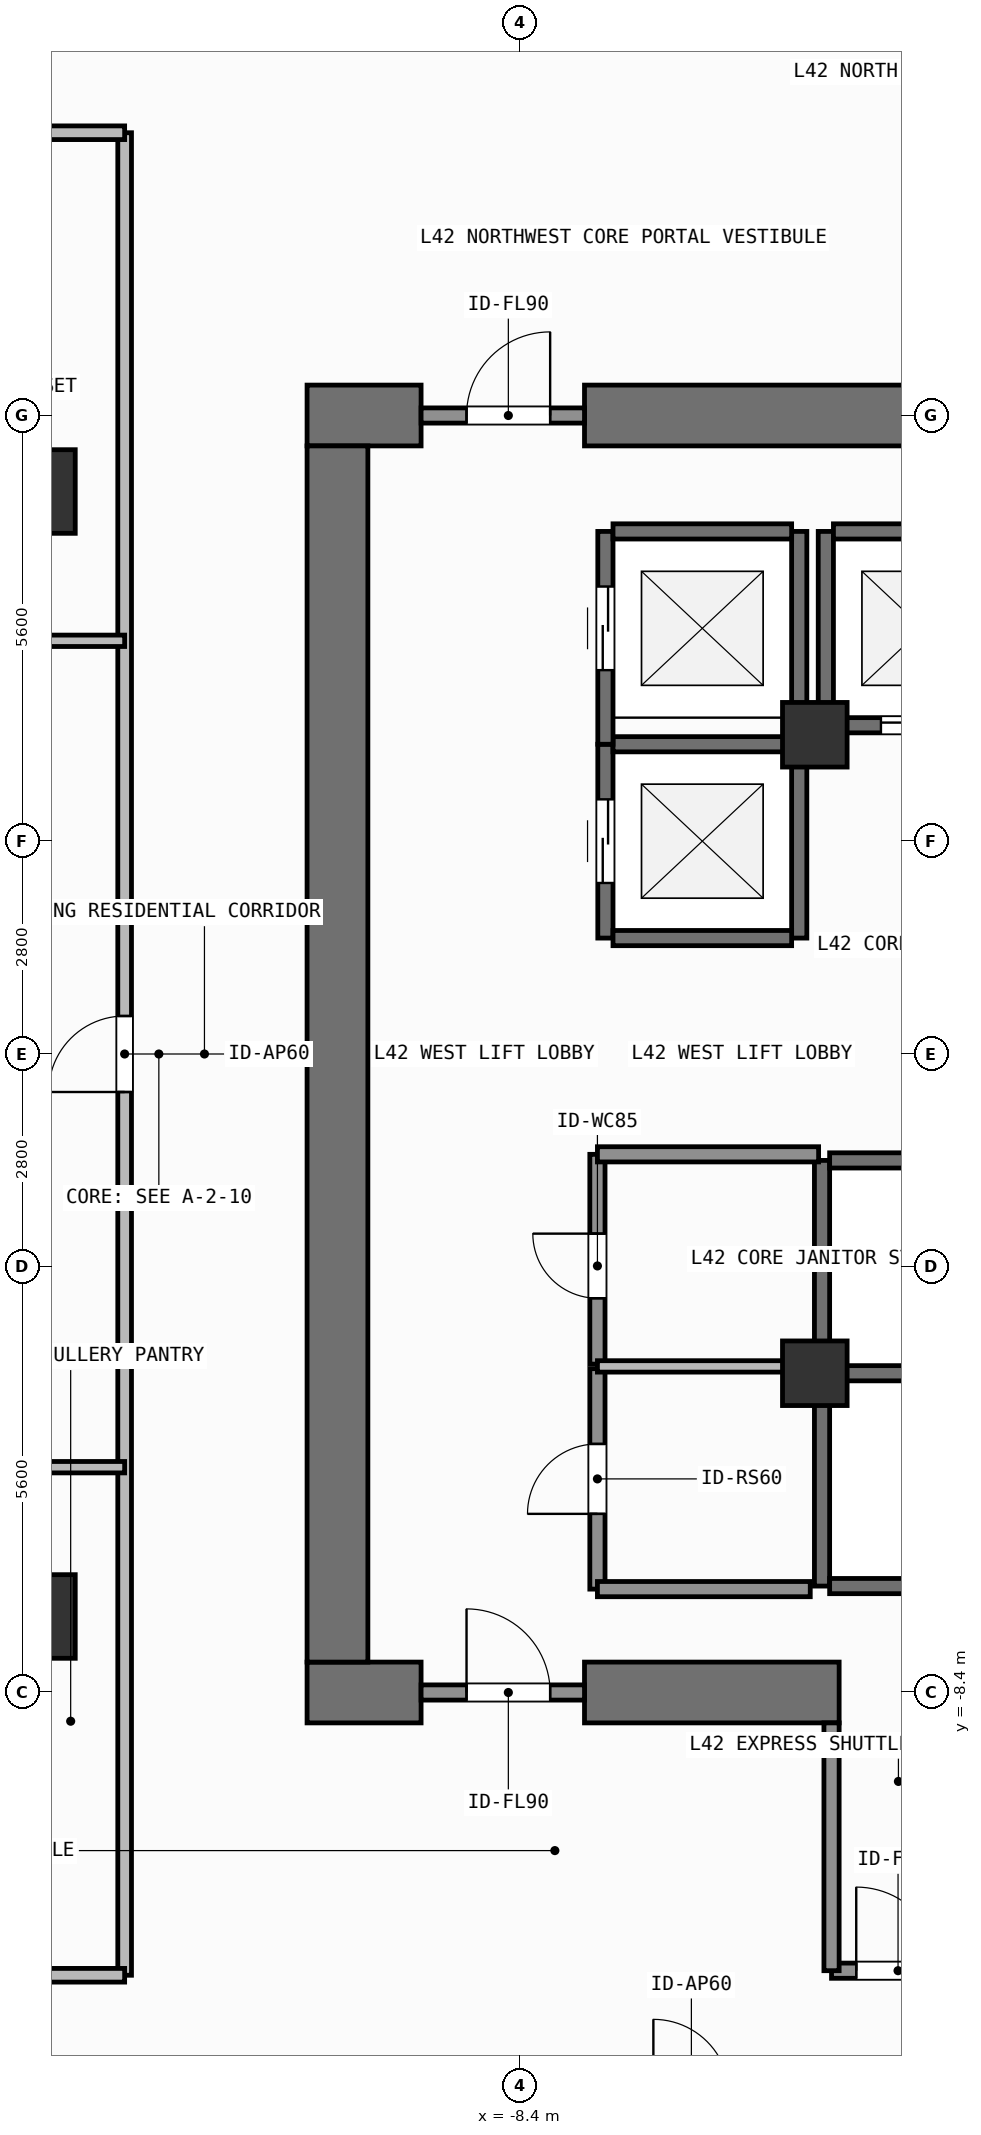
"""IFC4 building model, lengths in metres.
Left out: names, types, materials, properties, quantities, classifications, styles, units other than length and angle.
Written with IfcOpenShell. Run it as: python <this file> out.ifc"""

import sys

from ifc_helpers import new_model, si_unit, direction, frame, frame_2d, origin, origin_2d, place, context, subcontext, project, spatial, rectangle, extrude, element, fill, save


model = new_model("IFC4")
c1 = context("Model", 3, precision=1e-05, world=origin(), true_north=direction((0.0, 1.0)))
c2 = subcontext(c1, "Body", "Model", "MODEL_VIEW")
j1 = project(units=[si_unit("LENGTHUNIT", "METRE"), si_unit("PLANEANGLEUNIT", "RADIAN")], contexts=[c1])
p1 = place(None, origin())
s1 = spatial("IfcSite", under=j1, at=p1, CompositionType="ELEMENT")
p2 = place(p1, origin())
s2 = spatial("IfcBuilding", under=s1, at=p2, CompositionType="ELEMENT")
p3 = place(p2, frame((0.0, 0.0, 171.9)))
s3 = spatial("IfcBuildingStorey", under=s2, at=p3, CompositionType="ELEMENT", Elevation=171.9)
p4 = place(p3, frame((-11.2, -8.4, 0.0), z_axis=(0.0, 0.0, 1.0), x_axis=(1.0, 0.0, 0.0)))
e1 = element("IfcWall", 1, at=p4, inside=s3, PredefinedType="SHEAR", context=c2, shape_type="SweptSolid", body=[
    extrude(rectangle(XDim=1.5, YDim=0.8, at=frame_2d((0.75, 0.0))), origin(), (0.0, 0.0, 1.0), 3.9),
])
p5 = place(p3, frame((-7.55, -8.4, 0.0), z_axis=(0.0, 0.0, 1.0), x_axis=(1.0, 0.0, 0.0)))
e2 = element("IfcWall", 2, at=p5, inside=s3, PredefinedType="SHEAR", context=c2, shape_type="SweptSolid", body=[
    extrude(rectangle(XDim=3.35, YDim=0.8, at=frame_2d((1.675, 0.0))), origin(), (0.0, 0.0, 1.0), 3.9),
])
p6 = place(p3, frame((-11.2, 8.4, 0.0), z_axis=(0.0, 0.0, 1.0), x_axis=(1.0, 0.0, 0.0)))
e3 = element("IfcWall", 3, at=p6, inside=s3, PredefinedType="SHEAR", context=c2, shape_type="SweptSolid", body=[
    extrude(rectangle(XDim=1.5, YDim=0.8, at=frame_2d((0.75, 0.0))), origin(), (0.0, 0.0, 1.0), 3.9),
])
p7 = place(p3, frame((-7.55, 8.4, 0.0), z_axis=(0.0, 0.0, 1.0), x_axis=(1.0, 0.0, 0.0)))
e4 = element("IfcWall", 4, at=p7, inside=s3, PredefinedType="SHEAR", context=c2, shape_type="SweptSolid", body=[
    extrude(rectangle(XDim=16.35, YDim=0.8, at=frame_2d((8.175, 0.0))), origin(), (0.0, 0.0, 1.0), 3.9),
])
p8 = place(p3, frame((-10.8, -8.0, 0.0), z_axis=(0.0, 0.0, 1.0), x_axis=(0.0, 1.0, 0.0)))
e5 = element("IfcWall", 5, at=p8, inside=s3, PredefinedType="SHEAR", context=c2, shape_type="SweptSolid", body=[
    extrude(rectangle(XDim=16.0, YDim=0.8, at=frame_2d((8.0, 0.0))), origin(), (0.0, 0.0, 1.0), 3.9),
])
for number, where, z_axis, x_axis in (
    (6, (-14.8, -7.4, 0.0), (0.0, 0.0, 1.0), (1.0, 0.0, 0.0)),
    (7, (-14.8, 7.4, 0.0), (0.0, 0.0, 1.0), (1.0, 0.0, 0.0)),
):
    element("IfcColumn", number, at=place(p3, frame(where, z_axis=z_axis, x_axis=x_axis)), inside=s3, PredefinedType="COLUMN", context=c2, shape_type="SweptSolid", body=[
        extrude(rectangle(XDim=1.1, YDim=1.1, at=origin_2d()), origin(), (0.0, 0.0, 1.0), 3.9),
    ])
for number, where, z_axis, x_axis in (
    (8, (-4.52, -4.2, 0.0), (0.0, 0.0, 1.0), (1.0, 0.0, 0.0)),
    (9, (-4.52, 4.2, 0.0), (0.0, 0.0, 1.0), (1.0, 0.0, 0.0)),
):
    element("IfcColumn", number, at=place(p3, frame(where, z_axis=z_axis, x_axis=x_axis)), inside=s3, PredefinedType="COLUMN", context=c2, shape_type="SweptSolid", body=[
        extrude(rectangle(XDim=0.85, YDim=0.85, at=origin_2d()), origin(), (0.0, 0.0, 1.0), 3.9),
    ])
p9 = place(p3, frame((-7.275, 1.525, 0.0), z_axis=(0.0, 0.0, 1.0), x_axis=(0.0, 1.0, 0.0)))
e10 = element("IfcWall", 10, at=p9, inside=s3, PredefinedType="SHEAR", context=c2, shape_type="SweptSolid", body=[
    extrude(rectangle(XDim=2.55, YDim=0.2, at=frame_2d((1.275, 0.0))), origin(), (0.0, 0.0, 1.0), 3.68),
])
p10 = place(p9, frame((0.725, 0.0, 0.0)))
e11 = element("IfcOpeningElement", 11, at=p10, cuts=e10, PredefinedType="OPENING", context=c2, shape_type="SweptSolid", body=[
    extrude(rectangle(XDim=1.1, YDim=2.2, at=frame_2d((0.55, 1.1))), frame((0.0, 0.11, 0.0), z_axis=(0.0, -1.0, 0.0), x_axis=(1.0, 0.0, 0.0)), (0.0, 0.0, 1.0), 0.22),
])
p11 = place(p3, frame((-4.725, 1.525, 0.0), z_axis=(0.0, 0.0, 1.0), x_axis=(0.0, 1.0, 0.0)))
e12 = element("IfcWall", 12, at=p11, inside=s3, PredefinedType="SHEAR", context=c2, shape_type="SweptSolid", body=[
    extrude(rectangle(XDim=2.55, YDim=0.2, at=frame_2d((1.275, 0.0))), origin(), (0.0, 0.0, 1.0), 3.68),
])
for number, where, z_axis, x_axis in (
    (13, (-7.175, 1.525, 0.0), (0.0, 0.0, 1.0), (1.0, 0.0, 0.0)),
    (14, (-7.175, 4.075, 0.0), (0.0, 0.0, 1.0), (1.0, 0.0, 0.0)),
):
    element("IfcWall", number, at=place(p3, frame(where, z_axis=z_axis, x_axis=x_axis)), inside=s3, PredefinedType="SHEAR", context=c2, shape_type="SweptSolid", body=[
        extrude(rectangle(XDim=2.35, YDim=0.2, at=frame_2d((1.175, 0.0))), origin(), (0.0, 0.0, 1.0), 3.68),
    ])
p12 = place(p3, frame((-7.275, 4.075, 0.0), z_axis=(0.0, 0.0, 1.0), x_axis=(0.0, 1.0, 0.0)))
e15 = element("IfcWall", 15, at=p12, inside=s3, PredefinedType="SHEAR", context=c2, shape_type="SweptSolid", body=[
    extrude(rectangle(XDim=2.8, YDim=0.2, at=frame_2d((1.4, 0.0))), origin(), (0.0, 0.0, 1.0), 3.68),
])
p13 = place(p12, frame((0.975, 0.0, 0.0)))
e16 = element("IfcOpeningElement", 16, at=p13, cuts=e15, PredefinedType="OPENING", context=c2, shape_type="SweptSolid", body=[
    extrude(rectangle(XDim=1.1, YDim=2.2, at=frame_2d((0.55, 1.1))), frame((0.0, 0.11, 0.0), z_axis=(0.0, -1.0, 0.0), x_axis=(1.0, 0.0, 0.0)), (0.0, 0.0, 1.0), 0.22),
])
p14 = place(p3, frame((-4.725, 4.075, 0.0), z_axis=(0.0, 0.0, 1.0), x_axis=(0.0, 1.0, 0.0)))
e17 = element("IfcWall", 17, at=p14, inside=s3, PredefinedType="SHEAR", context=c2, shape_type="SweptSolid", body=[
    extrude(rectangle(XDim=2.8, YDim=0.2, at=frame_2d((1.4, 0.0))), origin(), (0.0, 0.0, 1.0), 3.68),
])
p15 = place(p3, frame((-7.175, 6.875, 0.0), z_axis=(0.0, 0.0, 1.0), x_axis=(1.0, 0.0, 0.0)))
e18 = element("IfcWall", 18, at=p15, inside=s3, PredefinedType="SHEAR", context=c2, shape_type="SweptSolid", body=[
    extrude(rectangle(XDim=2.35, YDim=0.2, at=frame_2d((1.175, 0.0))), origin(), (0.0, 0.0, 1.0), 3.68),
])
p16 = place(p3, frame((-4.375, 4.325, 0.0), z_axis=(0.0, 0.0, 1.0), x_axis=(0.0, 1.0, 0.0)))
e19 = element("IfcWall", 19, at=p16, inside=s3, PredefinedType="SHEAR", context=c2, shape_type="SweptSolid", body=[
    extrude(rectangle(XDim=2.55, YDim=0.2, at=frame_2d((1.275, 0.0))), origin(), (0.0, 0.0, 1.0), 3.68),
])
p17 = place(p3, frame((-4.275, 4.325, 0.0), z_axis=(0.0, 0.0, 1.0), x_axis=(1.0, 0.0, 0.0)))
e20 = element("IfcWall", 20, at=p17, inside=s3, PredefinedType="SHEAR", context=c2, shape_type="SweptSolid", body=[
    extrude(rectangle(XDim=2.35, YDim=0.2, at=frame_2d((1.175, 0.0))), origin(), (0.0, 0.0, 1.0), 3.68),
])
p18 = place(p17, frame((0.625, 0.0, 0.0)))
e21 = element("IfcOpeningElement", 21, at=p18, cuts=e20, PredefinedType="OPENING", context=c2, shape_type="SweptSolid", body=[
    extrude(rectangle(XDim=1.1, YDim=2.2, at=frame_2d((0.55, 1.1))), frame((0.0, 0.11, 0.0), z_axis=(0.0, -1.0, 0.0), x_axis=(1.0, 0.0, 0.0)), (0.0, 0.0, 1.0), 0.22),
])
p19 = place(p3, frame((-4.275, 6.875, 0.0), z_axis=(0.0, 0.0, 1.0), x_axis=(1.0, 0.0, 0.0)))
e22 = element("IfcWall", 22, at=p19, inside=s3, PredefinedType="SHEAR", context=c2, shape_type="SweptSolid", body=[
    extrude(rectangle(XDim=2.35, YDim=0.2, at=frame_2d((1.175, 0.0))), origin(), (0.0, 0.0, 1.0), 3.68),
])
p20 = place(p3, frame((-4.425, -7.0, 0.0), z_axis=(0.0, 0.0, 1.0), x_axis=(0.0, 1.0, 0.0)))
e23 = element("IfcWall", 23, at=p20, inside=s3, PredefinedType="SHEAR", context=c2, shape_type="SweptSolid", body=[
    extrude(rectangle(XDim=2.8, YDim=0.2, at=frame_2d((1.4, 0.0))), origin(), (0.0, 0.0, 1.0), 3.68),
])
for number, where, z_axis, x_axis in (
    (24, (-4.325, -7.0, 0.0), (0.0, 0.0, 1.0), (1.0, 0.0, 0.0)),
    (25, (-4.325, -4.2, 0.0), (0.0, 0.0, 1.0), (1.0, 0.0, 0.0)),
):
    element("IfcWall", number, at=place(p3, frame(where, z_axis=z_axis, x_axis=x_axis)), inside=s3, PredefinedType="SHEAR", context=c2, shape_type="SweptSolid", body=[
        extrude(rectangle(XDim=2.45, YDim=0.2, at=frame_2d((1.225, 0.0))), origin(), (0.0, 0.0, 1.0), 3.68),
    ])
p21 = place(p3, frame((-4.425, -4.2, 0.0), z_axis=(0.0, 0.0, 1.0), x_axis=(0.0, 1.0, 0.0)))
e26 = element("IfcWall", 26, at=p21, inside=s3, PredefinedType="SHEAR", context=c2, shape_type="SweptSolid", body=[
    extrude(rectangle(XDim=2.8, YDim=0.2, at=frame_2d((1.4, 0.0))), origin(), (0.0, 0.0, 1.0), 3.68),
])
p22 = place(p3, frame((-4.325, -1.4, 0.0), z_axis=(0.0, 0.0, 1.0), x_axis=(1.0, 0.0, 0.0)))
e27 = element("IfcWall", 27, at=p22, inside=s3, PredefinedType="SHEAR", context=c2, shape_type="SweptSolid", body=[
    extrude(rectangle(XDim=2.45, YDim=0.2, at=frame_2d((1.225, 0.0))), origin(), (0.0, 0.0, 1.0), 3.68),
])
p23 = place(p3, frame((-9.7, -8.4, 0.0), z_axis=(0.0, 0.0, 1.0), x_axis=(1.0, 0.0, 0.0)))
e28 = element("IfcWall", 28, at=p23, inside=s3, PredefinedType="SOLIDWALL", context=c2, shape_type="SweptSolid", body=[
    extrude(rectangle(XDim=2.15, YDim=0.2, at=frame_2d((1.075, 0.0))), origin(), (0.0, 0.0, 1.0), 2.82),
])
p24 = place(p23, frame((0.598, 0.0, 0.0)))
e29 = element("IfcOpeningElement", 29, at=p24, cuts=e28, PredefinedType="OPENING", context=c2, shape_type="SweptSolid", body=[
    extrude(rectangle(XDim=1.1, YDim=2.15, at=frame_2d((0.55, 1.075))), frame((0.0, 0.11, 0.0), z_axis=(0.0, -1.0, 0.0), x_axis=(1.0, 0.0, 0.0)), (0.0, 0.0, 1.0), 0.22),
])
p25 = place(p3, frame((-9.7, 8.4, 0.0), z_axis=(0.0, 0.0, 1.0), x_axis=(1.0, 0.0, 0.0)))
e30 = element("IfcWall", 30, at=p25, inside=s3, PredefinedType="SOLIDWALL", context=c2, shape_type="SweptSolid", body=[
    extrude(rectangle(XDim=2.15, YDim=0.2, at=frame_2d((1.075, 0.0))), origin(), (0.0, 0.0, 1.0), 2.82),
])
p26 = place(p25, frame((0.598, 0.0, 0.0)))
e31 = element("IfcOpeningElement", 31, at=p26, cuts=e30, PredefinedType="OPENING", context=c2, shape_type="SweptSolid", body=[
    extrude(rectangle(XDim=1.1, YDim=2.15, at=frame_2d((0.55, 1.075))), frame((0.0, 0.11, 0.0), z_axis=(0.0, -1.0, 0.0), x_axis=(1.0, 0.0, 0.0)), (0.0, 0.0, 1.0), 0.22),
])
p27 = place(p3, frame((-4.3, -12.06, 0.0), z_axis=(0.0, 0.0, 1.0), x_axis=(1.0, 0.0, 0.0)))
e32 = element("IfcWall", 32, at=p27, inside=s3, PredefinedType="SOLIDWALL", context=c2, shape_type="SweptSolid", body=[
    extrude(rectangle(XDim=1.75, YDim=0.2, at=frame_2d((0.875, 0.0))), origin(), (0.0, 0.0, 1.0), 3.68),
])
p28 = place(p27, frame((0.325, 0.0, 0.0)))
e33 = element("IfcOpeningElement", 33, at=p28, cuts=e32, PredefinedType="OPENING", context=c2, shape_type="SweptSolid", body=[
    extrude(rectangle(XDim=1.1, YDim=2.15, at=frame_2d((0.55, 1.075))), frame((0.0, 0.11, 0.0), z_axis=(0.0, -1.0, 0.0), x_axis=(1.0, 0.0, 0.0)), (0.0, 0.0, 1.0), 0.22),
])
p29 = place(p3, frame((-7.38, -7.04, 0.0), z_axis=(0.0, 0.0, 1.0), x_axis=(0.0, 1.0, 0.0)))
e34 = element("IfcWall", 34, at=p29, inside=s3, PredefinedType="SOLIDWALL", context=c2, shape_type="SweptSolid", body=[
    extrude(rectangle(XDim=2.9, YDim=0.2, at=frame_2d((1.45, 0.0))), origin(), (0.0, 0.0, 1.0), 3.68),
])
p30 = place(p29, frame((0.99, 0.0, 0.0)))
e35 = element("IfcOpeningElement", 35, at=p30, cuts=e34, PredefinedType="OPENING", context=c2, shape_type="SweptSolid", body=[
    extrude(rectangle(XDim=0.92, YDim=2.1, at=frame_2d((0.46, 1.05))), frame((0.0, 0.11, 0.0), z_axis=(0.0, -1.0, 0.0), x_axis=(1.0, 0.0, 0.0)), (0.0, 0.0, 1.0), 0.22),
])
p31 = place(p3, frame((-7.38, -4.08, 0.0), z_axis=(0.0, 0.0, 1.0), x_axis=(0.0, 1.0, 0.0)))
e36 = element("IfcWall", 36, at=p31, inside=s3, PredefinedType="SOLIDWALL", context=c2, shape_type="SweptSolid", body=[
    extrude(rectangle(XDim=2.76, YDim=0.2, at=frame_2d((1.38, 0.0))), origin(), (0.0, 0.0, 1.0), 3.68),
])
p32 = place(p31, frame((0.867, 0.0, 0.0)))
e37 = element("IfcOpeningElement", 37, at=p32, cuts=e36, PredefinedType="OPENING", context=c2, shape_type="SweptSolid", body=[
    extrude(rectangle(XDim=0.85, YDim=2.1, at=frame_2d((0.425, 1.05))), frame((0.0, 0.11, 0.0), z_axis=(0.0, -1.0, 0.0), x_axis=(1.0, 0.0, 0.0)), (0.0, 0.0, 1.0), 0.22),
])
p33 = place(p3, frame((-13.6, -12.12, 0.0), z_axis=(0.0, 0.0, 1.0), x_axis=(0.0, 1.0, 0.0)))
e38 = element("IfcWall", 38, at=p33, inside=s3, PredefinedType="PARTITIONING", context=c2, shape_type="SweptSolid", body=[
    extrude(rectangle(XDim=24.24, YDim=0.18, at=frame_2d((12.12, 0.0))), origin(), (0.0, 0.0, 1.0), 3.68),
])
p34 = place(p33, frame((11.62, 0.0, 0.0)))
e39 = element("IfcOpeningElement", 39, at=p34, cuts=e38, PredefinedType="OPENING", context=c2, shape_type="SweptSolid", body=[
    extrude(rectangle(XDim=1.0, YDim=2.2, at=frame_2d((0.5, 1.1))), frame((0.0, 0.1, 0.0), z_axis=(0.0, -1.0, 0.0), x_axis=(1.0, 0.0, 0.0)), (0.0, 0.0, 1.0), 0.2),
])
p35 = place(p3, frame((-18.223, 5.436, 0.0), z_axis=(0.0, 0.0, 1.0), x_axis=(1.0, 0.0, 0.0)))
e40 = element("IfcWall", 40, at=p35, inside=s3, PredefinedType="PARTITIONING", context=c2, shape_type="SweptSolid", body=[
    extrude(rectangle(XDim=4.623, YDim=0.15, at=frame_2d((2.312, 0.0))), origin(), (0.0, 0.0, 1.0), 3.68),
])
p36 = place(p35, frame((1.886, 0.0, 0.0)))
e41 = element("IfcOpeningElement", 41, at=p36, cuts=e40, PredefinedType="OPENING", context=c2, shape_type="SweptSolid", body=[
    extrude(rectangle(XDim=0.85, YDim=2.1, at=frame_2d((0.425, 1.05))), frame((0.0, 0.085, 0.0), z_axis=(0.0, -1.0, 0.0), x_axis=(1.0, 0.0, 0.0)), (0.0, 0.0, 1.0), 0.17),
])
p37 = place(p3, frame((-21.29, -5.436, 0.0), z_axis=(0.0, 0.0, 1.0), x_axis=(1.0, 0.0, 0.0)))
e42 = element("IfcWall", 42, at=p37, inside=s3, PredefinedType="PARTITIONING", context=c2, shape_type="SweptSolid", body=[
    extrude(rectangle(XDim=7.69, YDim=0.15, at=frame_2d((3.845, 0.0))), origin(), (0.0, 0.0, 1.0), 3.68),
])
p38 = place(p37, frame((3.332, 0.0, 0.0)))
e43 = element("IfcOpeningElement", 43, at=p38, cuts=e42, PredefinedType="OPENING", context=c2, shape_type="SweptSolid", body=[
    extrude(rectangle(XDim=0.85, YDim=2.1, at=frame_2d((0.425, 1.05))), frame((0.0, 0.085, 0.0), z_axis=(0.0, -1.0, 0.0), x_axis=(1.0, 0.0, 0.0)), (0.0, 0.0, 1.0), 0.17),
])
p39 = place(p3, frame((-4.3, -12.06, 0.0), z_axis=(0.0, 0.0, 1.0), x_axis=(0.0, 1.0, 0.0)))
e44 = element("IfcWall", 44, at=p39, inside=s3, PredefinedType="SOLIDWALL", context=c2, shape_type="SweptSolid", body=[
    extrude(rectangle(XDim=3.26, YDim=0.2, at=frame_2d((1.63, 0.0))), origin(), (0.0, 0.0, 1.0), 3.68),
])
p40 = place(p3, frame((-7.38, -1.32, 0.0), z_axis=(0.0, 0.0, 1.0), x_axis=(1.0, 0.0, 0.0)))
e45 = element("IfcWall", 45, at=p40, inside=s3, PredefinedType="SOLIDWALL", context=c2, shape_type="SweptSolid", body=[
    extrude(rectangle(XDim=2.91, YDim=0.2, at=frame_2d((1.455, 0.0))), origin(), (0.0, 0.0, 1.0), 3.68),
])
p41 = place(p3, frame((-7.38, -7.04, 0.0), z_axis=(0.0, 0.0, 1.0), x_axis=(1.0, 0.0, 0.0)))
e46 = element("IfcWall", 46, at=p41, inside=s3, PredefinedType="SOLIDWALL", context=c2, shape_type="SweptSolid", body=[
    extrude(rectangle(XDim=2.8, YDim=0.2, at=frame_2d((1.4, 0.0))), origin(), (0.0, 0.0, 1.0), 3.68),
])
p42 = place(p3, frame((-7.38, -4.11, 0.0), z_axis=(0.0, 0.0, 1.0), x_axis=(1.0, 0.0, 0.0)))
e47 = element("IfcWall", 47, at=p42, inside=s3, PredefinedType="PARTITIONING", context=c2, shape_type="SweptSolid", body=[
    extrude(rectangle(XDim=2.8, YDim=0.15, at=frame_2d((1.4, 0.0))), origin(), (0.0, 0.0, 1.0), 3.68),
])
for number, where, z_axis, x_axis in (
    (48, (-25.53, -12.12, 0.0), (0.0, 0.0, 1.0), (1.0, 0.0, 0.0)),
    (49, (-25.53, 12.12, 0.0), (0.0, 0.0, 1.0), (1.0, 0.0, 0.0)),
):
    element("IfcWall", number, at=place(p3, frame(where, z_axis=z_axis, x_axis=x_axis)), inside=s3, PredefinedType="PARTITIONING", context=c2, shape_type="SweptSolid", body=[
        extrude(rectangle(XDim=11.93, YDim=0.18, at=frame_2d((5.965, 0.0))), origin(), (0.0, 0.0, 1.0), 3.68),
    ])
p43 = place(p10, origin())
e50 = element("IfcDoor", 50, at=p43, inside=s3, OperationType="SLIDING_TO_LEFT", PredefinedType="DOOR", context=c2, shape_type="SweptSolid", body=[
    extrude(rectangle(XDim=1.1, YDim=2.2, at=frame_2d((0.55, 1.1))), frame((0.0, 0.025, 0.0), z_axis=(0.0, -1.0, 0.0), x_axis=(1.0, 0.0, 0.0)), (0.0, 0.0, 1.0), 0.05),
])
fill(e11, e50)
p44 = place(p13, origin())
e51 = element("IfcDoor", 51, at=p44, inside=s3, OperationType="SLIDING_TO_LEFT", PredefinedType="DOOR", context=c2, shape_type="SweptSolid", body=[
    extrude(rectangle(XDim=1.1, YDim=2.2, at=frame_2d((0.55, 1.1))), frame((0.0, 0.025, 0.0), z_axis=(0.0, -1.0, 0.0), x_axis=(1.0, 0.0, 0.0)), (0.0, 0.0, 1.0), 0.05),
])
fill(e16, e51)
p45 = place(p18, origin())
e52 = element("IfcDoor", 52, at=p45, inside=s3, OperationType="SLIDING_TO_LEFT", PredefinedType="DOOR", context=c2, shape_type="SweptSolid", body=[
    extrude(rectangle(XDim=1.1, YDim=2.2, at=frame_2d((0.55, 1.1))), frame((0.0, 0.025, 0.0), z_axis=(0.0, -1.0, 0.0), x_axis=(1.0, 0.0, 0.0)), (0.0, 0.0, 1.0), 0.05),
])
fill(e21, e52)
p46 = place(p24, origin())
e53 = element("IfcDoor", 53, at=p46, inside=s3, OperationType="SINGLE_SWING_LEFT", PredefinedType="DOOR", context=c2, shape_type="SweptSolid", body=[
    extrude(rectangle(XDim=1.1, YDim=2.15, at=frame_2d((0.55, 1.075))), frame((0.0, 0.025, 0.0), z_axis=(0.0, -1.0, 0.0), x_axis=(1.0, 0.0, 0.0)), (0.0, 0.0, 1.0), 0.05),
])
fill(e29, e53)
p47 = place(p26, origin())
e54 = element("IfcDoor", 54, at=p47, inside=s3, OperationType="SINGLE_SWING_RIGHT", PredefinedType="DOOR", context=c2, shape_type="SweptSolid", body=[
    extrude(rectangle(XDim=1.1, YDim=2.15, at=frame_2d((0.55, 1.075))), frame((0.0, 0.025, 0.0), z_axis=(0.0, -1.0, 0.0), x_axis=(1.0, 0.0, 0.0)), (0.0, 0.0, 1.0), 0.05),
])
fill(e31, e54)
p48 = place(p28, origin())
e55 = element("IfcDoor", 55, at=p48, inside=s3, OperationType="SINGLE_SWING_LEFT", PredefinedType="DOOR", context=c2, shape_type="SweptSolid", body=[
    extrude(rectangle(XDim=1.1, YDim=2.15, at=frame_2d((0.55, 1.075))), frame((0.0, 0.025, 0.0), z_axis=(0.0, -1.0, 0.0), x_axis=(1.0, 0.0, 0.0)), (0.0, 0.0, 1.0), 0.05),
])
fill(e33, e55)
p49 = place(p30, origin())
e56 = element("IfcDoor", 56, at=p49, inside=s3, OperationType="SINGLE_SWING_LEFT", PredefinedType="DOOR", context=c2, shape_type="SweptSolid", body=[
    extrude(rectangle(XDim=0.92, YDim=2.1, at=frame_2d((0.46, 1.05))), frame((0.0, 0.025, 0.0), z_axis=(0.0, -1.0, 0.0), x_axis=(1.0, 0.0, 0.0)), (0.0, 0.0, 1.0), 0.05),
])
fill(e35, e56)
p50 = place(p32, origin())
e57 = element("IfcDoor", 57, at=p50, inside=s3, OperationType="SINGLE_SWING_RIGHT", PredefinedType="DOOR", context=c2, shape_type="SweptSolid", body=[
    extrude(rectangle(XDim=0.85, YDim=2.1, at=frame_2d((0.425, 1.05))), frame((0.0, 0.025, 0.0), z_axis=(0.0, -1.0, 0.0), x_axis=(1.0, 0.0, 0.0)), (0.0, 0.0, 1.0), 0.05),
])
fill(e37, e57)
p51 = place(p34, origin())
e58 = element("IfcDoor", 58, at=p51, inside=s3, OperationType="SINGLE_SWING_LEFT", PredefinedType="DOOR", context=c2, shape_type="SweptSolid", body=[
    extrude(rectangle(XDim=1.0, YDim=2.2, at=frame_2d((0.5, 1.1))), frame((0.0, 0.025, 0.0), z_axis=(0.0, -1.0, 0.0), x_axis=(1.0, 0.0, 0.0)), (0.0, 0.0, 1.0), 0.05),
])
fill(e39, e58)
save(model, sys.argv[1])
